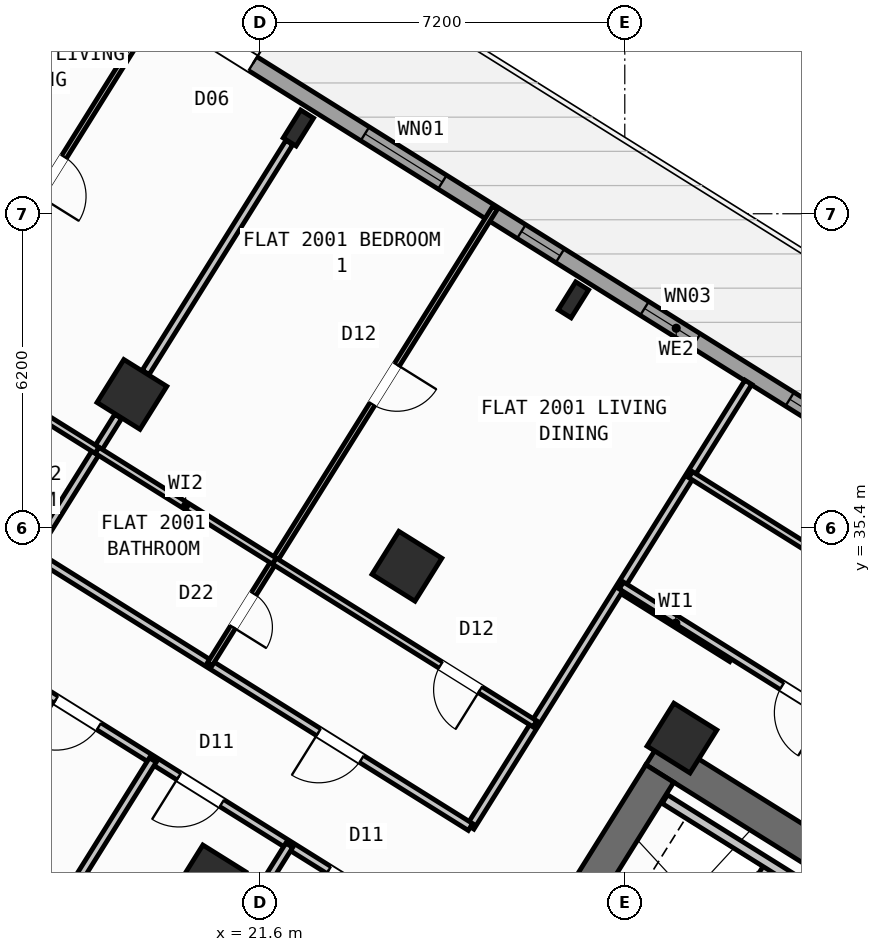
"""IFC4 building model, lengths in metres.
Left out: names, types, materials, properties, quantities, classifications, styles, units other than length and angle.
Written with IfcOpenShell. Run it as: python <this file> out.ifc"""

import sys

from ifc_helpers import new_model, si_unit, direction, frame, frame_2d, origin, origin_2d, place, context, subcontext, project, spatial, rectangle, hollow_rectangle, i_section, extrude, source, transform, mapped, element, fill, save


model = new_model("IFC4")
c1 = context("Model", 3, precision=1e-05, world=origin(), true_north=direction((0.0, 1.0)))
c2 = subcontext(c1, "Body", "Model", "MODEL_VIEW")
j1 = project(units=[si_unit("LENGTHUNIT", "METRE"), si_unit("PLANEANGLEUNIT", "RADIAN")], contexts=[c1])
p1 = place(None, origin())
s1 = spatial("IfcSite", under=j1, at=p1, CompositionType="ELEMENT")
p2 = place(p1, origin())
s2 = spatial("IfcBuilding", under=s1, at=p2, CompositionType="ELEMENT")
p3 = place(p2, frame((0.0, 0.0, 81.0)))
s3 = spatial("IfcBuildingStorey", under=s2, at=p3, CompositionType="ELEMENT", Elevation=81.0)
p4 = place(p3, frame((40.615, 23.983, 0.0), z_axis=(0.0, 0.0, 1.0), x_axis=(-0.848045953968, 0.529922692436, 0.0)))
e1 = element("IfcWall", 1, at=p4, inside=s3, PredefinedType="SHEAR", context=c2, shape_type="SweptSolid", body=[
    extrude(rectangle(XDim=13.24, YDim=0.65, at=frame_2d((6.62, 0.0))), origin(), (0.0, 0.0, 1.0), 3.32),
])
p5 = place(p3, frame((29.491, 30.552, 0.0), z_axis=(0.0, 0.0, 1.0), x_axis=(-0.529893103397, -0.8480644427, 0.0)))
e2 = element("IfcWall", 2, at=p5, inside=s3, PredefinedType="SHEAR", context=c2, shape_type="SweptSolid", body=[
    extrude(rectangle(XDim=3.525, YDim=0.65, at=frame_2d((1.763, 0.0))), origin(), (0.0, 0.0, 1.0), 3.32),
])
m1 = source(origin(), c2, "Body", "SweptSolid", [
    extrude(hollow_rectangle(XDim=1.0, YDim=1.0, WallThickness=0.04, at=origin_2d()), origin(), (0.0, 0.0, 1.0), 3.6),
])
p6 = place(p3, frame((29.928, 31.251, 0.0), z_axis=(0.0, 0.0, 1.0), x_axis=(-0.848048096156, 0.529919264233, 0.0)))
e3 = element("IfcColumn", 3, at=p6, inside=s3, PredefinedType="COLUMN", context=c2, shape_type="MappedRepresentation", body=[
    mapped(m1, transform((0.0, 0.0, 0.0), scale=1.0)),
])
m2 = source(origin(), c2, "Body", "SweptSolid", [
    extrude(i_section(OverallWidth=0.3, OverallDepth=0.65, WebThickness=0.016, FlangeThickness=0.031, at=origin_2d()), origin(), (0.0, 0.0, 1.0), 3.6),
])
p7 = place(p3, frame((27.786, 39.901, 0.0), z_axis=(0.0, 0.0, 1.0), x_axis=(-0.848048096156, 0.529919264233, 0.0)))
e4 = element("IfcColumn", 4, at=p7, inside=s3, PredefinedType="COLUMN", context=c2, shape_type="MappedRepresentation", body=[
    mapped(m2, transform((0.0, 0.0, 0.0), scale=1.0)),
])
for number, where, z_axis, x_axis in (
    (5, (24.5, 34.643, 0.0), (0.0, 0.0, 1.0), (-0.848, 0.53, 0.0)),
    (6, (20.632, 28.452, 0.0), (0.0, 0.0, 1.0), (-0.848, 0.53, 0.0)),
):
    element("IfcColumn", number, at=place(p3, frame(where, z_axis=z_axis, x_axis=x_axis)), inside=s3, PredefinedType="COLUMN", context=c2, shape_type="MappedRepresentation", body=[
        mapped(m1, transform((0.0, 0.0, 0.0), scale=1.0)),
    ])
p8 = place(p3, frame((22.358, 43.292, 0.0), z_axis=(0.0, 0.0, 1.0), x_axis=(-0.848048096156, 0.529919264233, 0.0)))
e7 = element("IfcColumn", 7, at=p8, inside=s3, PredefinedType="COLUMN", context=c2, shape_type="MappedRepresentation", body=[
    mapped(m2, transform((0.0, 0.0, 0.0), scale=1.0)),
])
p9 = place(p3, frame((19.073, 38.034, 0.0), z_axis=(0.0, 0.0, 1.0), x_axis=(-0.848048096156, 0.529919264233, 0.0)))
e8 = element("IfcColumn", 8, at=p9, inside=s3, PredefinedType="COLUMN", context=c2, shape_type="MappedRepresentation", body=[
    mapped(m1, transform((0.0, 0.0, 0.0), scale=1.0)),
])
p10 = place(p3, frame((17.424, 47.083, 0.0), z_axis=(0.0, 0.0, 1.0), x_axis=(0.848049927979, -0.529916332693, 0.0)))
e9 = element("IfcWall", 9, at=p10, inside=s3, PredefinedType="STANDARD", context=c2, shape_type="SweptSolid", body=[
    extrude(rectangle(XDim=29.223, YDim=0.32, at=frame_2d((14.612, 0.0))), origin(), (0.0, 0.0, 1.0), 3.32),
])
p11 = place(p10, frame((3.709, 0.0, 0.0)))
e10 = element("IfcOpeningElement", 10, at=p11, cuts=e9, PredefinedType="OPENING", context=c2, shape_type="SweptSolid", body=[
    extrude(rectangle(XDim=1.05, YDim=2.15, at=frame_2d((0.525, 1.075))), frame((0.0, 0.17, 0.0), z_axis=(0.0, -1.0, 0.0), x_axis=(1.0, 0.0, 0.0)), (0.0, 0.0, 1.0), 0.34),
])
p12 = place(p10, frame((0.659, 0.0, 0.95)))
e11 = element("IfcOpeningElement", 11, at=p12, cuts=e9, PredefinedType="OPENING", context=c2, shape_type="SweptSolid", body=[
    extrude(rectangle(XDim=1.2, YDim=1.4, at=frame_2d((0.6, 0.7))), frame((0.0, 0.17, 0.0), z_axis=(0.0, -1.0, 0.0), x_axis=(1.0, 0.0, 0.0)), (0.0, 0.0, 1.0), 0.34),
])
p13 = place(p10, frame((7.369, 0.0, 0.85)))
e12 = element("IfcOpeningElement", 12, at=p13, cuts=e9, PredefinedType="OPENING", context=c2, shape_type="SweptSolid", body=[
    extrude(rectangle(XDim=1.8, YDim=1.5, at=frame_2d((0.9, 0.75))), frame((0.0, 0.17, 0.0), z_axis=(0.0, -1.0, 0.0), x_axis=(1.0, 0.0, 0.0)), (0.0, 0.0, 1.0), 0.34),
])
p14 = place(p10, frame((11.009, 0.0, 1.0)))
e13 = element("IfcOpeningElement", 13, at=p14, cuts=e9, PredefinedType="OPENING", context=c2, shape_type="SweptSolid", body=[
    extrude(rectangle(XDim=0.9, YDim=1.25, at=frame_2d((0.45, 0.625))), frame((0.0, 0.17, 0.0), z_axis=(0.0, -1.0, 0.0), x_axis=(1.0, 0.0, 0.0)), (0.0, 0.0, 1.0), 0.34),
])
p15 = place(p10, frame((13.874, 0.0, 0.95)))
e14 = element("IfcOpeningElement", 14, at=p15, cuts=e9, PredefinedType="OPENING", context=c2, shape_type="SweptSolid", body=[
    extrude(rectangle(XDim=1.2, YDim=1.4, at=frame_2d((0.6, 0.7))), frame((0.0, 0.17, 0.0), z_axis=(0.0, -1.0, 0.0), x_axis=(1.0, 0.0, 0.0)), (0.0, 0.0, 1.0), 0.34),
])
p16 = place(p10, frame((17.254, 0.0, 1.0)))
e15 = element("IfcOpeningElement", 15, at=p16, cuts=e9, PredefinedType="OPENING", context=c2, shape_type="SweptSolid", body=[
    extrude(rectangle(XDim=0.9, YDim=1.25, at=frame_2d((0.45, 0.625))), frame((0.0, 0.17, 0.0), z_axis=(0.0, -1.0, 0.0), x_axis=(1.0, 0.0, 0.0)), (0.0, 0.0, 1.0), 0.34),
])
p17 = place(p10, frame((20.764, 0.0, 0.8)))
e16 = element("IfcOpeningElement", 16, at=p17, cuts=e9, PredefinedType="OPENING", context=c2, shape_type="SweptSolid", body=[
    extrude(rectangle(XDim=2.1, YDim=1.55, at=frame_2d((1.05, 0.775))), frame((0.0, 0.17, 0.0), z_axis=(0.0, -1.0, 0.0), x_axis=(1.0, 0.0, 0.0)), (0.0, 0.0, 1.0), 0.34),
])
p18 = place(p10, frame((25.403, 0.0, 0.8)))
e17 = element("IfcOpeningElement", 17, at=p18, cuts=e9, PredefinedType="OPENING", context=c2, shape_type="SweptSolid", body=[
    extrude(rectangle(XDim=2.1, YDim=1.55, at=frame_2d((1.05, 0.775))), frame((0.0, 0.17, 0.0), z_axis=(0.0, -1.0, 0.0), x_axis=(1.0, 0.0, 0.0)), (0.0, 0.0, 1.0), 0.34),
])
p19 = place(p3, frame((31.645, 28.716, 0.0), z_axis=(0.0, 0.0, 1.0), x_axis=(-0.52986693015, -0.848080795876, 0.0)))
e18 = element("IfcWall", 18, at=p19, inside=s3, PredefinedType="STANDARD", context=c2, shape_type="SweptSolid", body=[
    extrude(rectangle(XDim=2.66, YDim=0.2, at=frame_2d((1.33, 0.0))), origin(), (0.0, 0.0, 1.0), 3.31),
])
p20 = place(p3, frame((33.363, 27.69, 0.0), z_axis=(0.0, 0.0, 1.0), x_axis=(-0.848053806312, 0.529910125964, 0.0)))
e19 = element("IfcWall", 19, at=p20, inside=s3, PredefinedType="STANDARD", context=c2, shape_type="SweptSolid", body=[
    extrude(rectangle(XDim=4.448, YDim=0.2, at=frame_2d((2.224, 0.0))), origin(), (0.0, 0.0, 1.0), 3.31),
])
p21 = place(p3, frame((30.914, 32.829, 0.0), z_axis=(0.0, 0.0, 1.0), x_axis=(-0.848008813643, 0.529982124211, 0.0)))
e20 = element("IfcWall", 20, at=p21, inside=s3, PredefinedType="PARTITIONING", context=c2, shape_type="SweptSolid", body=[
    extrude(rectangle(XDim=2.61, YDim=0.16, at=frame_2d((1.305, 0.0))), origin(), (0.0, 0.0, 1.0), 3.31),
])
p22 = place(p3, frame((31.239, 38.274, 0.0), z_axis=(0.0, 0.0, 1.0), x_axis=(-0.529914125013, -0.848051307476, 0.0)))
e21 = element("IfcWall", 21, at=p22, inside=s3, PredefinedType="PARTITIONING", context=c2, shape_type="SweptSolid", body=[
    extrude(rectangle(XDim=10.35, YDim=0.16, at=frame_2d((5.175, 0.0))), origin(), (0.0, 0.0, 1.0), 3.31),
])
p23 = place(p3, frame((25.754, 29.497, 0.0), z_axis=(0.0, 0.0, 1.0), x_axis=(-0.848045850158, 0.529922858565, 0.0)))
e22 = element("IfcWall", 22, at=p23, inside=s3, PredefinedType="PARTITIONING", context=c2, shape_type="SweptSolid", body=[
    extrude(rectangle(XDim=16.73, YDim=0.16, at=frame_2d((8.365, 0.0))), origin(), (0.0, 0.0, 1.0), 3.31),
])
p24 = place(p23, frame((2.532, 0.0, 0.0)))
e23 = element("IfcOpeningElement", 23, at=p24, cuts=e22, PredefinedType="OPENING", context=c2, shape_type="SweptSolid", body=[
    extrude(rectangle(XDim=1.0, YDim=2.1, at=frame_2d((0.5, 1.05))), frame((0.0, 0.09, 0.0), z_axis=(0.0, -1.0, 0.0), x_axis=(1.0, 0.0, 0.0)), (0.0, 0.0, 1.0), 0.18),
])
p25 = place(p23, frame((14.76, 0.0, 0.0)))
e24 = element("IfcOpeningElement", 24, at=p25, cuts=e22, PredefinedType="OPENING", context=c2, shape_type="SweptSolid", body=[
    extrude(rectangle(XDim=1.0, YDim=2.1, at=frame_2d((0.5, 1.05))), frame((0.0, 0.09, 0.0), z_axis=(0.0, -1.0, 0.0), x_axis=(1.0, 0.0, 0.0)), (0.0, 0.0, 1.0), 0.18),
])
p26 = place(p3, frame((24.588, 27.631, 0.0), z_axis=(0.0, 0.0, 1.0), x_axis=(-0.848041752158, 0.529929416617, 0.0)))
e25 = element("IfcWall", 25, at=p26, inside=s3, PredefinedType="PARTITIONING", context=c2, shape_type="SweptSolid", body=[
    extrude(rectangle(XDim=16.73, YDim=0.16, at=frame_2d((8.365, 0.0))), origin(), (0.0, 0.0, 1.0), 3.31),
])
p27 = place(p26, frame((0.92, 0.0, 0.0)))
e26 = element("IfcOpeningElement", 26, at=p27, cuts=e25, PredefinedType="OPENING", context=c2, shape_type="SweptSolid", body=[
    extrude(rectangle(XDim=1.0, YDim=2.1, at=frame_2d((0.5, 1.05))), frame((0.0, 0.09, 0.0), z_axis=(0.0, -1.0, 0.0), x_axis=(1.0, 0.0, 0.0)), (0.0, 0.0, 1.0), 0.18),
])
p28 = place(p26, frame((4.408, 0.0, 0.0)))
e27 = element("IfcOpeningElement", 27, at=p28, cuts=e25, PredefinedType="OPENING", context=c2, shape_type="SweptSolid", body=[
    extrude(rectangle(XDim=1.0, YDim=2.1, at=frame_2d((0.5, 1.05))), frame((0.0, 0.09, 0.0), z_axis=(0.0, -1.0, 0.0), x_axis=(1.0, 0.0, 0.0)), (0.0, 0.0, 1.0), 0.18),
])
p29 = place(p26, frame((7.271, 0.0, 0.0)))
e28 = element("IfcOpeningElement", 28, at=p29, cuts=e25, PredefinedType="OPENING", context=c2, shape_type="SweptSolid", body=[
    extrude(rectangle(XDim=1.0, YDim=2.1, at=frame_2d((0.5, 1.05))), frame((0.0, 0.09, 0.0), z_axis=(0.0, -1.0, 0.0), x_axis=(1.0, 0.0, 0.0)), (0.0, 0.0, 1.0), 0.18),
])
p30 = place(p26, frame((10.78, 0.0, 0.0)))
e29 = element("IfcOpeningElement", 29, at=p30, cuts=e25, PredefinedType="OPENING", context=c2, shape_type="SweptSolid", body=[
    extrude(rectangle(XDim=1.0, YDim=2.1, at=frame_2d((0.5, 1.05))), frame((0.0, 0.09, 0.0), z_axis=(0.0, -1.0, 0.0), x_axis=(1.0, 0.0, 0.0)), (0.0, 0.0, 1.0), 0.18),
])
p31 = place(p26, frame((14.372, 0.0, 0.0)))
e30 = element("IfcOpeningElement", 30, at=p31, cuts=e25, PredefinedType="OPENING", context=c2, shape_type="SweptSolid", body=[
    extrude(rectangle(XDim=1.0, YDim=2.1, at=frame_2d((0.5, 1.05))), frame((0.0, 0.09, 0.0), z_axis=(0.0, -1.0, 0.0), x_axis=(1.0, 0.0, 0.0)), (0.0, 0.0, 1.0), 0.18),
])
p32 = place(p3, frame((22.179, 29.136, 0.0), z_axis=(0.0, 0.0, 1.0), x_axis=(-0.529922190913, -0.848046267357, 0.0)))
e31 = element("IfcWall", 31, at=p32, inside=s3, PredefinedType="PARTITIONING", context=c2, shape_type="SweptSolid", body=[
    extrude(rectangle(XDim=9.15, YDim=0.16, at=frame_2d((4.575, 0.0))), origin(), (0.0, 0.0, 1.0), 3.31),
])
p33 = place(p3, frame((19.486, 30.819, 0.0), z_axis=(0.0, 0.0, 1.0), x_axis=(-0.529914992377, -0.848050765494, 0.0)))
e32 = element("IfcWall", 32, at=p33, inside=s3, PredefinedType="PARTITIONING", context=c2, shape_type="SweptSolid", body=[
    extrude(rectangle(XDim=9.15, YDim=0.16, at=frame_2d((4.575, 0.0))), origin(), (0.0, 0.0, 1.0), 2.935),
])
p34 = place(p3, frame((22.18, 43.006, 0.0), z_axis=(0.0, 0.0, 1.0), x_axis=(-0.529937421401, -0.848036750028, 0.0)))
e33 = element("IfcWall", 33, at=p34, inside=s3, PredefinedType="PARTITIONING", context=c2, shape_type="SweptSolid", body=[
    extrude(rectangle(XDim=5.351, YDim=0.16, at=frame_2d((2.676, 0.0))), origin(), (0.0, 0.0, 1.0), 2.745),
])
p35 = place(p3, frame((18.802, 37.6, 0.0), z_axis=(0.0, 0.0, 1.0), x_axis=(-0.529875025416, -0.848075738033, 0.0)))
e34 = element("IfcWall", 34, at=p35, inside=s3, PredefinedType="PARTITIONING", context=c2, shape_type="SweptSolid", body=[
    extrude(rectangle(XDim=3.188, YDim=0.16, at=frame_2d((1.594, 0.0))), origin(), (0.0, 0.0, 1.0), 2.745),
])
p36 = place(p3, frame((26.238, 41.717, 0.0), z_axis=(0.0, 0.0, 1.0), x_axis=(-0.529939012684, -0.848035755635, 0.0)))
e35 = element("IfcWall", 35, at=p36, inside=s3, PredefinedType="PARTITIONING", context=c2, shape_type="SweptSolid", body=[
    extrude(rectangle(XDim=10.62, YDim=0.11, at=frame_2d((5.31, 0.0))), origin(), (0.0, 0.0, 1.0), 2.935),
])
p37 = place(p36, frame((8.98, 0.0, 0.0)))
e36 = element("IfcOpeningElement", 36, at=p37, cuts=e35, PredefinedType="OPENING", context=c2, shape_type="SweptSolid", body=[
    extrude(rectangle(XDim=0.78, YDim=2.05, at=frame_2d((0.39, 1.025))), frame((0.0, 0.065, 0.0), z_axis=(0.0, -1.0, 0.0), x_axis=(1.0, 0.0, 0.0)), (0.0, 0.0, 1.0), 0.13),
])
p38 = place(p36, frame((3.65, 0.0, 0.0)))
e37 = element("IfcOpeningElement", 37, at=p38, cuts=e35, PredefinedType="OPENING", context=c2, shape_type="SweptSolid", body=[
    extrude(rectangle(XDim=0.92, YDim=2.08, at=frame_2d((0.46, 1.04))), frame((0.0, 0.065, 0.0), z_axis=(0.0, -1.0, 0.0), x_axis=(1.0, 0.0, 0.0)), (0.0, 0.0, 1.0), 0.13),
])
p39 = place(p3, frame((27.026, 31.532, 0.0), z_axis=(0.0, 0.0, 1.0), x_axis=(-0.8480503147, 0.529915713804, 0.0)))
e38 = element("IfcWall", 38, at=p39, inside=s3, PredefinedType="PLUMBINGWALL", context=c2, shape_type="SweptSolid", body=[
    extrude(rectangle(XDim=6.065, YDim=0.14, at=frame_2d((3.032, 0.0))), origin(), (0.0, 0.0, 1.0), 3.31),
])
p40 = place(p39, frame((1.272, 0.0, 0.0)))
e39 = element("IfcOpeningElement", 39, at=p40, cuts=e38, PredefinedType="OPENING", context=c2, shape_type="SweptSolid", body=[
    extrude(rectangle(XDim=0.92, YDim=2.08, at=frame_2d((0.46, 1.04))), frame((0.0, 0.08, 0.0), z_axis=(0.0, -1.0, 0.0), x_axis=(1.0, 0.0, 0.0)), (0.0, 0.0, 1.0), 0.16),
])
p41 = place(p3, frame((21.882, 34.746, 0.0), z_axis=(0.0, 0.0, 1.0), x_axis=(-0.848041525148, 0.529929779899, 0.0)))
e40 = element("IfcWall", 40, at=p41, inside=s3, PredefinedType="PLUMBINGWALL", context=c2, shape_type="SweptSolid", body=[
    extrude(rectangle(XDim=4.125, YDim=0.14, at=frame_2d((2.062, 0.0))), origin(), (0.0, 0.0, 1.0), 3.31),
])
p42 = place(p3, frame((19.67, 45.821, 0.0), z_axis=(0.0, 0.0, 1.0), x_axis=(-0.529922479612, -0.848046086956, 0.0)))
e41 = element("IfcWall", 41, at=p42, inside=s3, PredefinedType="PARTITIONING", context=c2, shape_type="SweptSolid", body=[
    extrude(rectangle(XDim=10.62, YDim=0.11, at=frame_2d((5.31, 0.0))), origin(), (0.0, 0.0, 1.0), 3.31),
])
p43 = place(p42, frame((8.98, 0.0, 0.0)))
e42 = element("IfcOpeningElement", 42, at=p43, cuts=e41, PredefinedType="OPENING", context=c2, shape_type="SweptSolid", body=[
    extrude(rectangle(XDim=0.78, YDim=2.05, at=frame_2d((0.39, 1.025))), frame((0.0, 0.065, 0.0), z_axis=(0.0, -1.0, 0.0), x_axis=(1.0, 0.0, 0.0)), (0.0, 0.0, 1.0), 0.13),
])
p44 = place(p42, frame((3.65, 0.0, 0.0)))
e43 = element("IfcOpeningElement", 43, at=p44, cuts=e41, PredefinedType="OPENING", context=c2, shape_type="SweptSolid", body=[
    extrude(rectangle(XDim=0.92, YDim=2.08, at=frame_2d((0.46, 1.04))), frame((0.0, 0.065, 0.0), z_axis=(0.0, -1.0, 0.0), x_axis=(1.0, 0.0, 0.0)), (0.0, 0.0, 1.0), 0.13),
])
p45 = place(p3, frame((18.384, 36.932, 0.0), z_axis=(0.0, 0.0, 1.0), x_axis=(-0.848051346257, 0.52991406295, 0.0)))
e44 = element("IfcWall", 44, at=p45, inside=s3, PredefinedType="PLUMBINGWALL", context=c2, shape_type="SweptSolid", body=[
    extrude(rectangle(XDim=3.62, YDim=0.14, at=frame_2d((1.81, 0.0))), origin(), (0.0, 0.0, 1.0), 3.31),
])
p46 = place(p3, frame((41.936, 26.012, 0.0), z_axis=(0.0, 0.0, 1.0), x_axis=(-0.848051154596, 0.529914369676, 0.0)))
e45 = element("IfcWall", 45, at=p46, inside=s3, PredefinedType="PARTITIONING", context=c2, shape_type="SweptSolid", body=[
    extrude(rectangle(XDim=15.57, YDim=0.16, at=frame_2d((7.785, 0.0))), origin(), (0.0, 0.0, 1.0), 3.31),
])
p47 = place(p46, frame((10.83, 0.0, 0.0)))
e46 = element("IfcOpeningElement", 46, at=p47, cuts=e45, PredefinedType="OPENING", context=c2, shape_type="SweptSolid", body=[
    extrude(rectangle(XDim=1.0, YDim=2.1, at=frame_2d((0.5, 1.05))), frame((0.0, 0.09, 0.0), z_axis=(0.0, -1.0, 0.0), x_axis=(1.0, 0.0, 0.0)), (0.0, 0.0, 1.0), 0.18),
])
p48 = place(p3, frame((42.226, 28.873, 0.0), z_axis=(0.0, 0.0, 1.0), x_axis=(-0.848049134363, 0.529917602752, 0.0)))
e47 = element("IfcWall", 47, at=p48, inside=s3, PredefinedType="PLUMBINGWALL", context=c2, shape_type="SweptSolid", body=[
    extrude(rectangle(XDim=14.3, YDim=0.14, at=frame_2d((7.15, 0.0))), origin(), (0.0, 0.0, 1.0), 3.31),
])
p49 = place(p48, frame((9.57, 0.0, 0.0)))
e48 = element("IfcOpeningElement", 48, at=p49, cuts=e47, PredefinedType="OPENING", context=c2, shape_type="SweptSolid", body=[
    extrude(rectangle(XDim=0.92, YDim=2.08, at=frame_2d((0.46, 1.04))), frame((0.0, 0.08, 0.0), z_axis=(0.0, -1.0, 0.0), x_axis=(1.0, 0.0, 0.0)), (0.0, 0.0, 1.0), 0.16),
])
m3 = source(origin(), c2, "Body", "SweptSolid", [
    extrude(rectangle(XDim=1.05, YDim=2.15, at=frame_2d((0.525, 1.075))), frame((0.0, 0.025, 0.0), z_axis=(0.0, -1.0, 0.0), x_axis=(1.0, 0.0, 0.0)), (0.0, 0.0, 1.0), 0.05),
])
p50 = place(p11, origin())
e49 = element("IfcDoor", 49, at=p50, inside=s3, OperationType="SINGLE_SWING_RIGHT", PredefinedType="DOOR", context=c2, shape_type="MappedRepresentation", body=[
    mapped(m3, transform((0.0, 0.0, 0.0), scale=1.0)),
])
fill(e10, e49)
m4 = source(origin(), c2, "Body", "SweptSolid", [
    extrude(rectangle(XDim=1.8, YDim=1.5, at=frame_2d((0.9, 0.75))), frame((0.0, 0.03, 0.0), z_axis=(0.0, -1.0, 0.0), x_axis=(1.0, 0.0, 0.0)), (0.0, 0.0, 1.0), 0.06),
])
p51 = place(p13, origin())
e50 = element("IfcWindow", 50, at=p51, inside=s3, PartitioningType="SINGLE_PANEL", PredefinedType="WINDOW", context=c2, shape_type="MappedRepresentation", body=[
    mapped(m4, transform((0.0, 0.0, 0.0), scale=1.0)),
])
fill(e12, e50)
m5 = source(origin(), c2, "Body", "SweptSolid", [
    extrude(rectangle(XDim=0.9, YDim=1.25, at=frame_2d((0.45, 0.625))), frame((0.0, 0.03, 0.0), z_axis=(0.0, -1.0, 0.0), x_axis=(1.0, 0.0, 0.0)), (0.0, 0.0, 1.0), 0.06),
])
p52 = place(p14, origin())
e51 = element("IfcWindow", 51, at=p52, inside=s3, PartitioningType="SINGLE_PANEL", PredefinedType="WINDOW", context=c2, shape_type="MappedRepresentation", body=[
    mapped(m5, transform((0.0, 0.0, 0.0), scale=1.0)),
])
fill(e13, e51)
m6 = source(origin(), c2, "Body", "SweptSolid", [
    extrude(rectangle(XDim=1.2, YDim=1.4, at=frame_2d((0.6, 0.7))), frame((0.0, 0.03, 0.0), z_axis=(0.0, -1.0, 0.0), x_axis=(1.0, 0.0, 0.0)), (0.0, 0.0, 1.0), 0.06),
])
p53 = place(p15, origin())
e52 = element("IfcWindow", 52, at=p53, inside=s3, PartitioningType="SINGLE_PANEL", PredefinedType="WINDOW", context=c2, shape_type="MappedRepresentation", body=[
    mapped(m6, transform((0.0, 0.0, 0.0), scale=1.0)),
])
fill(e14, e52)
p54 = place(p16, origin())
e53 = element("IfcWindow", 53, at=p54, inside=s3, PartitioningType="SINGLE_PANEL", PredefinedType="WINDOW", context=c2, shape_type="MappedRepresentation", body=[
    mapped(m5, transform((0.0, 0.0, 0.0), scale=1.0)),
])
fill(e15, e53)
m7 = source(origin(), c2, "Body", "SweptSolid", [
    extrude(rectangle(XDim=1.0, YDim=2.1, at=frame_2d((0.5, 1.05))), frame((0.0, 0.025, 0.0), z_axis=(0.0, -1.0, 0.0), x_axis=(1.0, 0.0, 0.0)), (0.0, 0.0, 1.0), 0.05),
])
p55 = place(p27, origin())
e54 = element("IfcDoor", 54, at=p55, inside=s3, OperationType="SINGLE_SWING_RIGHT", PredefinedType="DOOR", context=c2, shape_type="MappedRepresentation", body=[
    mapped(m7, transform((0.0, 0.0, 0.0), scale=1.0)),
])
fill(e26, e54)
p56 = place(p28, origin())
e55 = element("IfcDoor", 55, at=p56, inside=s3, OperationType="SINGLE_SWING_RIGHT", PredefinedType="DOOR", context=c2, shape_type="MappedRepresentation", body=[
    mapped(m7, transform((0.0, 0.0, 0.0), scale=1.0)),
])
fill(e27, e55)
p57 = place(p29, origin())
e56 = element("IfcDoor", 56, at=p57, inside=s3, OperationType="SINGLE_SWING_RIGHT", PredefinedType="DOOR", context=c2, shape_type="MappedRepresentation", body=[
    mapped(m7, transform((0.0, 0.0, 0.0), scale=1.0)),
])
fill(e28, e56)
p58 = place(p24, origin())
e57 = element("IfcDoor", 57, at=p58, inside=s3, OperationType="SINGLE_SWING_RIGHT", PredefinedType="DOOR", context=c2, shape_type="MappedRepresentation", body=[
    mapped(m7, transform((0.0, 0.0, 0.0), scale=1.0)),
])
fill(e23, e57)
m8 = source(origin(), c2, "Body", "SweptSolid", [
    extrude(rectangle(XDim=0.92, YDim=2.08, at=frame_2d((0.46, 1.04))), frame((0.0, 0.025, 0.0), z_axis=(0.0, -1.0, 0.0), x_axis=(1.0, 0.0, 0.0)), (0.0, 0.0, 1.0), 0.05),
])
p59 = place(p40, origin())
e58 = element("IfcDoor", 58, at=p59, inside=s3, OperationType="SINGLE_SWING_LEFT", PredefinedType="DOOR", context=c2, shape_type="MappedRepresentation", body=[
    mapped(m8, transform((0.0, 0.0, 0.0), scale=1.0)),
])
fill(e39, e58)
m9 = source(origin(), c2, "Body", "SweptSolid", [
    extrude(rectangle(XDim=0.78, YDim=2.05, at=frame_2d((0.39, 1.025))), frame((0.0, 0.025, 0.0), z_axis=(0.0, -1.0, 0.0), x_axis=(1.0, 0.0, 0.0)), (0.0, 0.0, 1.0), 0.05),
])
p60 = place(p37, origin())
e59 = element("IfcDoor", 59, at=p60, inside=s3, OperationType="SINGLE_SWING_RIGHT", PredefinedType="DOOR", context=c2, shape_type="MappedRepresentation", body=[
    mapped(m9, transform((0.0, 0.0, 0.0), scale=1.0)),
])
fill(e36, e59)
p61 = place(p38, origin())
e60 = element("IfcDoor", 60, at=p61, inside=s3, OperationType="SINGLE_SWING_LEFT", PredefinedType="DOOR", context=c2, shape_type="MappedRepresentation", body=[
    mapped(m8, transform((0.0, 0.0, 0.0), scale=1.0)),
])
fill(e37, e60)
p62 = place(p44, origin())
e61 = element("IfcDoor", 61, at=p62, inside=s3, OperationType="SINGLE_SWING_RIGHT", PredefinedType="DOOR", context=c2, shape_type="MappedRepresentation", body=[
    mapped(m8, transform((0.0, 0.0, 0.0), scale=1.0)),
])
fill(e43, e61)
p63 = place(p47, origin())
e62 = element("IfcDoor", 62, at=p63, inside=s3, OperationType="SINGLE_SWING_LEFT", PredefinedType="DOOR", context=c2, shape_type="MappedRepresentation", body=[
    mapped(m7, transform((0.0, 0.0, 0.0), scale=1.0)),
])
fill(e46, e62)
save(model, sys.argv[1])
